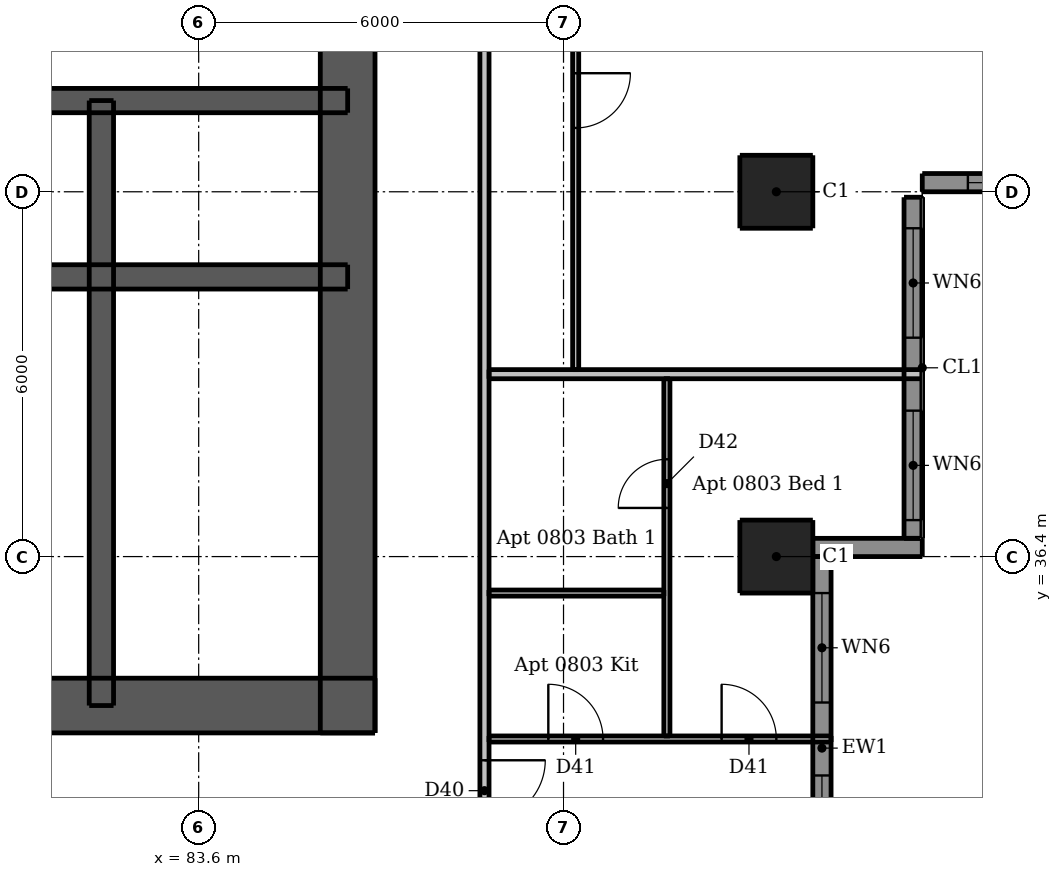
"""IFC4 building model, lengths in metres.
Left out: names, types, materials, properties, quantities, classifications, styles, units other than length and angle.
Written with IfcOpenShell. Run it as: python <this file> out.ifc"""

import sys

from ifc_helpers import new_model, si_unit, direction, frame, frame_2d, origin, origin_2d, place, context, subcontext, project, spatial, rectangle, extrude, element, fill, save


model = new_model("IFC4")
c1 = context("Model", 3, precision=1e-05, world=origin(), true_north=direction((0.0, 1.0)))
c2 = subcontext(c1, "Body", "Model", "MODEL_VIEW")
j1 = project(units=[si_unit("LENGTHUNIT", "METRE"), si_unit("PLANEANGLEUNIT", "RADIAN")], contexts=[c1])
p1 = place(None, origin())
s1 = spatial("IfcSite", under=j1, at=p1, CompositionType="ELEMENT")
p2 = place(p1, origin())
s2 = spatial("IfcBuilding", under=s1, at=p2, CompositionType="ELEMENT")
p3 = place(p2, frame((0.0, 0.0, 33.4)))
s3 = spatial("IfcBuildingStorey", under=s2, at=p3, CompositionType="ELEMENT", Elevation=33.4)
p4 = place(p3, frame((62.5, 33.95, 0.0), z_axis=(0.0, 0.0, 1.0), x_axis=(1.0, 0.0, 0.0)))
e1 = element("IfcWall", 1, at=p4, inside=s3, PredefinedType="SHEAR", context=c2, shape_type="SweptSolid", body=[
    extrude(rectangle(XDim=24.0, YDim=0.9, at=frame_2d((12.0, 0.0))), origin(), (0.0, 0.0, 1.0), 3.05),
])
p5 = place(p4, frame((2.05, 0.0, 0.0)))
e2 = element("IfcOpeningElement", 2, at=p5, cuts=e1, PredefinedType="OPENING", context=c2, shape_type="SweptSolid", body=[
    extrude(rectangle(XDim=1.1, YDim=2.1, at=frame_2d((0.55, 1.05))), frame((0.0, 0.46, 0.0), z_axis=(0.0, -1.0, 0.0), x_axis=(1.0, 0.0, 0.0)), (0.0, 0.0, 1.0), 0.92),
])
p6 = place(p4, frame((20.85, 0.0, 0.0)))
e3 = element("IfcOpeningElement", 3, at=p6, cuts=e1, PredefinedType="OPENING", context=c2, shape_type="SweptSolid", body=[
    extrude(rectangle(XDim=1.1, YDim=2.1, at=frame_2d((0.55, 1.05))), frame((0.0, 0.46, 0.0), z_axis=(0.0, -1.0, 0.0), x_axis=(1.0, 0.0, 0.0)), (0.0, 0.0, 1.0), 0.92),
])
p7 = place(p4, frame((8.0, 0.0, 0.0)))
e4 = element("IfcOpeningElement", 4, at=p7, cuts=e1, PredefinedType="OPENING", context=c2, shape_type="SweptSolid", body=[
    extrude(rectangle(XDim=1.1, YDim=2.1, at=frame_2d((0.55, 1.05))), frame((0.0, 0.46, 0.0), z_axis=(0.0, -1.0, 0.0), x_axis=(1.0, 0.0, 0.0)), (0.0, 0.0, 1.0), 0.92),
])
p8 = place(p4, frame((16.363, 0.0, 0.0)))
e5 = element("IfcOpeningElement", 5, at=p8, cuts=e1, PredefinedType="OPENING", context=c2, shape_type="SweptSolid", body=[
    extrude(rectangle(XDim=0.9, YDim=2.1, at=frame_2d((0.45, 1.05))), frame((0.0, 0.46, 0.0), z_axis=(0.0, -1.0, 0.0), x_axis=(1.0, 0.0, 0.0)), (0.0, 0.0, 1.0), 0.92),
])
p9 = place(p3, frame((86.05, 33.5, 0.0), z_axis=(0.0, 0.0, 1.0), x_axis=(0.0, 1.0, 0.0)))
e6 = element("IfcWall", 6, at=p9, inside=s3, PredefinedType="SHEAR", context=c2, shape_type="SweptSolid", body=[
    extrude(rectangle(XDim=24.0, YDim=0.9, at=frame_2d((12.0, 0.0))), origin(), (0.0, 0.0, 1.0), 3.05),
])
p10 = place(p9, frame((11.2, 0.0, 0.0)))
e7 = element("IfcOpeningElement", 7, at=p10, cuts=e6, PredefinedType="OPENING", context=c2, shape_type="SweptSolid", body=[
    extrude(rectangle(XDim=1.6, YDim=2.1, at=frame_2d((0.8, 1.05))), frame((0.0, 0.46, 0.0), z_axis=(0.0, -1.0, 0.0), x_axis=(1.0, 0.0, 0.0)), (0.0, 0.0, 1.0), 0.92),
])
p11 = place(p3, frame((62.95, 41.0, 0.0), z_axis=(0.0, 0.0, 1.0), x_axis=(1.0, 0.0, 0.0)))
e8 = element("IfcWall", 8, at=p11, inside=s3, PredefinedType="SHEAR", context=c2, shape_type="SweptSolid", body=[
    extrude(rectangle(XDim=23.1, YDim=0.4, at=frame_2d((11.55, 0.0))), origin(), (0.0, 0.0, 1.0), 3.05),
])
p12 = place(p3, frame((62.95, 43.9, 0.0), z_axis=(0.0, 0.0, 1.0), x_axis=(1.0, 0.0, 0.0)))
e9 = element("IfcWall", 9, at=p12, inside=s3, PredefinedType="SHEAR", context=c2, shape_type="SweptSolid", body=[
    extrude(rectangle(XDim=23.1, YDim=0.4, at=frame_2d((11.55, 0.0))), origin(), (0.0, 0.0, 1.0), 3.05),
])
p13 = place(p12, frame((0.85, 0.0, 0.0)))
e10 = element("IfcOpeningElement", 10, at=p13, cuts=e9, PredefinedType="OPENING", context=c2, shape_type="SweptSolid", body=[
    extrude(rectangle(XDim=0.9, YDim=2.1, at=frame_2d((0.45, 1.05))), frame((0.0, 0.21, 0.0), z_axis=(0.0, -1.0, 0.0), x_axis=(1.0, 0.0, 0.0)), (0.0, 0.0, 1.0), 0.42),
])
p14 = place(p12, frame((2.55, 0.0, 0.0)))
e11 = element("IfcOpeningElement", 11, at=p14, cuts=e9, PredefinedType="OPENING", context=c2, shape_type="SweptSolid", body=[
    extrude(rectangle(XDim=0.9, YDim=2.1, at=frame_2d((0.45, 1.05))), frame((0.0, 0.21, 0.0), z_axis=(0.0, -1.0, 0.0), x_axis=(1.0, 0.0, 0.0)), (0.0, 0.0, 1.0), 0.42),
])
p15 = place(p12, frame((20.5, 0.0, 0.0)))
e12 = element("IfcOpeningElement", 12, at=p15, cuts=e9, PredefinedType="OPENING", context=c2, shape_type="SweptSolid", body=[
    extrude(rectangle(XDim=0.9, YDim=2.1, at=frame_2d((0.45, 1.05))), frame((0.0, 0.21, 0.0), z_axis=(0.0, -1.0, 0.0), x_axis=(1.0, 0.0, 0.0)), (0.0, 0.0, 1.0), 0.42),
])
p16 = place(p12, frame((4.75, 0.0, 0.0)))
e13 = element("IfcOpeningElement", 13, at=p16, cuts=e9, PredefinedType="OPENING", context=c2, shape_type="SweptSolid", body=[
    extrude(rectangle(XDim=1.1, YDim=2.1, at=frame_2d((0.55, 1.05))), frame((0.0, 0.21, 0.0), z_axis=(0.0, -1.0, 0.0), x_axis=(1.0, 0.0, 0.0)), (0.0, 0.0, 1.0), 0.42),
])
p17 = place(p12, frame((7.25, 0.0, 0.0)))
e14 = element("IfcOpeningElement", 14, at=p17, cuts=e9, PredefinedType="OPENING", context=c2, shape_type="SweptSolid", body=[
    extrude(rectangle(XDim=1.1, YDim=2.1, at=frame_2d((0.55, 1.05))), frame((0.0, 0.21, 0.0), z_axis=(0.0, -1.0, 0.0), x_axis=(1.0, 0.0, 0.0)), (0.0, 0.0, 1.0), 0.42),
])
p18 = place(p12, frame((9.75, 0.0, 0.0)))
e15 = element("IfcOpeningElement", 15, at=p18, cuts=e9, PredefinedType="OPENING", context=c2, shape_type="SweptSolid", body=[
    extrude(rectangle(XDim=1.1, YDim=2.1, at=frame_2d((0.55, 1.05))), frame((0.0, 0.21, 0.0), z_axis=(0.0, -1.0, 0.0), x_axis=(1.0, 0.0, 0.0)), (0.0, 0.0, 1.0), 0.42),
])
p19 = place(p12, frame((12.25, 0.0, 0.0)))
e16 = element("IfcOpeningElement", 16, at=p19, cuts=e9, PredefinedType="OPENING", context=c2, shape_type="SweptSolid", body=[
    extrude(rectangle(XDim=1.1, YDim=2.1, at=frame_2d((0.55, 1.05))), frame((0.0, 0.21, 0.0), z_axis=(0.0, -1.0, 0.0), x_axis=(1.0, 0.0, 0.0)), (0.0, 0.0, 1.0), 0.42),
])
p20 = place(p12, frame((14.75, 0.0, 0.0)))
e17 = element("IfcOpeningElement", 17, at=p20, cuts=e9, PredefinedType="OPENING", context=c2, shape_type="SweptSolid", body=[
    extrude(rectangle(XDim=1.1, YDim=2.1, at=frame_2d((0.55, 1.05))), frame((0.0, 0.21, 0.0), z_axis=(0.0, -1.0, 0.0), x_axis=(1.0, 0.0, 0.0)), (0.0, 0.0, 1.0), 0.42),
])
p21 = place(p12, frame((17.25, 0.0, 0.0)))
e18 = element("IfcOpeningElement", 18, at=p21, cuts=e9, PredefinedType="OPENING", context=c2, shape_type="SweptSolid", body=[
    extrude(rectangle(XDim=1.1, YDim=2.1, at=frame_2d((0.55, 1.05))), frame((0.0, 0.21, 0.0), z_axis=(0.0, -1.0, 0.0), x_axis=(1.0, 0.0, 0.0)), (0.0, 0.0, 1.0), 0.42),
])
p22 = place(p3, frame((82.0, 33.95, 0.0), z_axis=(0.0, 0.0, 1.0), x_axis=(0.0, 1.0, 0.0)))
e19 = element("IfcWall", 19, at=p22, inside=s3, PredefinedType="SHEAR", context=c2, shape_type="SweptSolid", body=[
    extrude(rectangle(XDim=9.95, YDim=0.4, at=frame_2d((4.975, 0.0))), origin(), (0.0, 0.0, 1.0), 3.05),
])
for number, where, z_axis, x_axis in (
    (20, (93.1, 36.4, 0.0), (0.0, 0.0, 1.0), (1.0, 0.0, 0.0)),
    (21, (93.1, 42.4, 0.0), (0.0, 0.0, 1.0), (1.0, 0.0, 0.0)),
):
    element("IfcColumn", number, at=place(p3, frame(where, z_axis=z_axis, x_axis=x_axis)), inside=s3, PredefinedType="COLUMN", context=c2, shape_type="SweptSolid", body=[
        extrude(rectangle(XDim=1.2, YDim=1.2, at=origin_2d()), origin(), (0.0, 0.0, 1.0), 3.05),
    ])
p23 = place(p3, frame((93.7, 36.55, 0.0), z_axis=(0.0, 0.0, 1.0), x_axis=(1.0, 0.0, 0.0)))
e22 = element("IfcWall", 22, at=p23, inside=s3, PredefinedType="SOLIDWALL", context=c2, shape_type="SweptSolid", body=[
    extrude(rectangle(XDim=1.8, YDim=0.3, at=frame_2d((0.9, 0.0))), origin(), (0.0, 0.0, 1.0), 3.05),
])
p24 = place(p3, frame((95.5, 42.55, 0.0), z_axis=(0.0, 0.0, 1.0), x_axis=(1.0, 0.0, 0.0)))
e23 = element("IfcWall", 23, at=p24, inside=s3, PredefinedType="SOLIDWALL", context=c2, shape_type="SweptSolid", body=[
    extrude(rectangle(XDim=3.0, YDim=0.3, at=frame_2d((1.5, 0.0))), origin(), (0.0, 0.0, 1.0), 3.05),
])
p25 = place(p24, frame((0.75, 0.0, 0.9)))
e24 = element("IfcOpeningElement", 24, at=p25, cuts=e23, PredefinedType="OPENING", context=c2, shape_type="SweptSolid", body=[
    extrude(rectangle(XDim=1.5, YDim=1.5, at=frame_2d((0.75, 0.75))), frame((0.0, 0.16, 0.0), z_axis=(0.0, -1.0, 0.0), x_axis=(1.0, 0.0, 0.0)), (0.0, 0.0, 1.0), 0.32),
])
p26 = place(p3, frame((93.85, 30.1, 0.0), z_axis=(0.0, 0.0, 1.0), x_axis=(0.0, 1.0, 0.0)))
e25 = element("IfcWall", 25, at=p26, inside=s3, PredefinedType="SOLIDWALL", context=c2, shape_type="SweptSolid", body=[
    extrude(rectangle(XDim=6.3, YDim=0.3, at=frame_2d((3.15, 0.0))), origin(), (0.0, 0.0, 1.0), 3.05),
])
p27 = place(p26, frame((0.9, 0.0, 0.15)))
e26 = element("IfcOpeningElement", 26, at=p27, cuts=e25, PredefinedType="OPENING", context=c2, shape_type="SweptSolid", body=[
    extrude(rectangle(XDim=1.8, YDim=2.1, at=frame_2d((0.9, 1.05))), frame((0.0, 0.16, 0.0), z_axis=(0.0, -1.0, 0.0), x_axis=(1.0, 0.0, 0.0)), (0.0, 0.0, 1.0), 0.32),
])
p28 = place(p26, frame((3.9, 0.0, 0.15)))
e27 = element("IfcOpeningElement", 27, at=p28, cuts=e25, PredefinedType="OPENING", context=c2, shape_type="SweptSolid", body=[
    extrude(rectangle(XDim=1.8, YDim=2.1, at=frame_2d((0.9, 1.05))), frame((0.0, 0.16, 0.0), z_axis=(0.0, -1.0, 0.0), x_axis=(1.0, 0.0, 0.0)), (0.0, 0.0, 1.0), 0.32),
])
p29 = place(p3, frame((95.35, 36.7, 0.0), z_axis=(0.0, 0.0, 1.0), x_axis=(0.0, 1.0, 0.0)))
e28 = element("IfcWall", 28, at=p29, inside=s3, PredefinedType="SOLIDWALL", context=c2, shape_type="SweptSolid", body=[
    extrude(rectangle(XDim=5.61, YDim=0.3, at=frame_2d((2.805, 0.0))), origin(), (0.0, 0.0, 1.0), 3.05),
])
p30 = place(p29, frame((0.3, 0.0, 0.15)))
e29 = element("IfcOpeningElement", 29, at=p30, cuts=e28, PredefinedType="OPENING", context=c2, shape_type="SweptSolid", body=[
    extrude(rectangle(XDim=1.8, YDim=2.1, at=frame_2d((0.9, 1.05))), frame((0.0, 0.16, 0.0), z_axis=(0.0, -1.0, 0.0), x_axis=(1.0, 0.0, 0.0)), (0.0, 0.0, 1.0), 0.32),
])
p31 = place(p29, frame((3.3, 0.0, 0.15)))
e30 = element("IfcOpeningElement", 30, at=p31, cuts=e28, PredefinedType="OPENING", context=c2, shape_type="SweptSolid", body=[
    extrude(rectangle(XDim=1.8, YDim=2.1, at=frame_2d((0.9, 1.05))), frame((0.0, 0.16, 0.0), z_axis=(0.0, -1.0, 0.0), x_axis=(1.0, 0.0, 0.0)), (0.0, 0.0, 1.0), 0.32),
])
p32 = place(p3, frame((89.8, 59.35, 0.0), z_axis=(0.0, 0.0, 1.0), x_axis=(0.0, -1.0, 0.0)))
e31 = element("IfcWall", 31, at=p32, inside=s3, PredefinedType="PARTITIONING", context=c2, shape_type="SweptSolid", body=[
    extrude(rectangle(XDim=19.875, YDim=0.1, at=frame_2d((9.938, 0.0))), origin(), (0.0, 0.0, 1.0), 3.05),
])
p33 = place(p32, frame((15.0, 0.0, 0.0)))
e32 = element("IfcOpeningElement", 32, at=p33, cuts=e31, PredefinedType="OPENING", context=c2, shape_type="SweptSolid", body=[
    extrude(rectangle(XDim=0.9, YDim=2.1, at=frame_2d((0.45, 1.05))), frame((0.0, 0.06, 0.0), z_axis=(0.0, -1.0, 0.0), x_axis=(1.0, 0.0, 0.0)), (0.0, 0.0, 1.0), 0.12),
])
p34 = place(p32, frame((9.0, 0.0, 0.0)))
e33 = element("IfcOpeningElement", 33, at=p34, cuts=e31, PredefinedType="OPENING", context=c2, shape_type="SweptSolid", body=[
    extrude(rectangle(XDim=0.9, YDim=2.1, at=frame_2d((0.45, 1.05))), frame((0.0, 0.06, 0.0), z_axis=(0.0, -1.0, 0.0), x_axis=(1.0, 0.0, 0.0)), (0.0, 0.0, 1.0), 0.12),
])
p35 = place(p32, frame((6.0, 0.0, 0.0)))
e34 = element("IfcOpeningElement", 34, at=p35, cuts=e31, PredefinedType="OPENING", context=c2, shape_type="SweptSolid", body=[
    extrude(rectangle(XDim=0.9, YDim=2.1, at=frame_2d((0.45, 1.05))), frame((0.0, 0.06, 0.0), z_axis=(0.0, -1.0, 0.0), x_axis=(1.0, 0.0, 0.0)), (0.0, 0.0, 1.0), 0.12),
])
p36 = place(p32, frame((0.85, 0.0, 0.0)))
e35 = element("IfcOpeningElement", 35, at=p36, cuts=e31, PredefinedType="OPENING", context=c2, shape_type="SweptSolid", body=[
    extrude(rectangle(XDim=0.9, YDim=2.1, at=frame_2d((0.45, 1.05))), frame((0.0, 0.06, 0.0), z_axis=(0.0, -1.0, 0.0), x_axis=(1.0, 0.0, 0.0)), (0.0, 0.0, 1.0), 0.12),
])
p37 = place(p32, frame((3.35, 0.0, 0.0)))
e36 = element("IfcOpeningElement", 36, at=p37, cuts=e31, PredefinedType="OPENING", context=c2, shape_type="SweptSolid", body=[
    extrude(rectangle(XDim=0.8, YDim=2.1, at=frame_2d((0.4, 1.05))), frame((0.0, 0.06, 0.0), z_axis=(0.0, -1.0, 0.0), x_axis=(1.0, 0.0, 0.0)), (0.0, 0.0, 1.0), 0.12),
])
p38 = place(p3, frame((91.3, 33.45, 0.0), z_axis=(0.0, 0.0, 1.0), x_axis=(0.0, 1.0, 0.0)))
e37 = element("IfcWall", 37, at=p38, inside=s3, PredefinedType="PARTITIONING", context=c2, shape_type="SweptSolid", body=[
    extrude(rectangle(XDim=5.875, YDim=0.1, at=frame_2d((2.938, 0.0))), origin(), (0.0, 0.0, 1.0), 3.05),
])
p39 = place(p38, frame((3.75, 0.0, 0.0)))
e38 = element("IfcOpeningElement", 38, at=p39, cuts=e37, PredefinedType="OPENING", context=c2, shape_type="SweptSolid", body=[
    extrude(rectangle(XDim=0.8, YDim=2.1, at=frame_2d((0.4, 1.05))), frame((0.0, 0.06, 0.0), z_axis=(0.0, -1.0, 0.0), x_axis=(1.0, 0.0, 0.0)), (0.0, 0.0, 1.0), 0.12),
])
p40 = place(p3, frame((88.375, 35.8, 0.0), z_axis=(0.0, 0.0, 1.0), x_axis=(1.0, 0.0, 0.0)))
e39 = element("IfcWall", 39, at=p40, inside=s3, PredefinedType="PARTITIONING", context=c2, shape_type="SweptSolid", body=[
    extrude(rectangle(XDim=2.875, YDim=0.1, at=frame_2d((1.438, 0.0))), origin(), (0.0, 0.0, 1.0), 3.05),
])
p41 = place(p3, frame((88.375, 33.4, 0.0), z_axis=(0.0, 0.0, 1.0), x_axis=(1.0, 0.0, 0.0)))
e40 = element("IfcWall", 40, at=p41, inside=s3, PredefinedType="PARTITIONING", context=c2, shape_type="SweptSolid", body=[
    extrude(rectangle(XDim=5.625, YDim=0.1, at=frame_2d((2.812, 0.0))), origin(), (0.0, 0.0, 1.0), 3.05),
])
p42 = place(p41, frame((0.975, 0.0, 0.0)))
e41 = element("IfcOpeningElement", 41, at=p42, cuts=e40, PredefinedType="OPENING", context=c2, shape_type="SweptSolid", body=[
    extrude(rectangle(XDim=0.9, YDim=2.1, at=frame_2d((0.45, 1.05))), frame((0.0, 0.06, 0.0), z_axis=(0.0, -1.0, 0.0), x_axis=(1.0, 0.0, 0.0)), (0.0, 0.0, 1.0), 0.12),
])
p43 = place(p41, frame((3.825, 0.0, 0.0)))
e42 = element("IfcOpeningElement", 42, at=p43, cuts=e40, PredefinedType="OPENING", context=c2, shape_type="SweptSolid", body=[
    extrude(rectangle(XDim=0.9, YDim=2.1, at=frame_2d((0.45, 1.05))), frame((0.0, 0.06, 0.0), z_axis=(0.0, -1.0, 0.0), x_axis=(1.0, 0.0, 0.0)), (0.0, 0.0, 1.0), 0.12),
])
p44 = place(p3, frame((88.3, 60.475, 0.0), z_axis=(0.0, 0.0, 1.0), x_axis=(0.0, -1.0, 0.0)))
e43 = element("IfcWall", 43, at=p44, inside=s3, PredefinedType="PARTITIONING", context=c2, shape_type="SweptSolid", body=[
    extrude(rectangle(XDim=28.7, YDim=0.15, at=frame_2d((14.35, 0.0))), origin(), (0.0, 0.0, 1.0), 3.05),
])
p45 = place(p44, frame((27.425, 0.0, 0.0)))
e44 = element("IfcOpeningElement", 44, at=p45, cuts=e43, PredefinedType="OPENING", context=c2, shape_type="SweptSolid", body=[
    extrude(rectangle(XDim=1.0, YDim=2.1, at=frame_2d((0.5, 1.05))), frame((0.0, 0.085, 0.0), z_axis=(0.0, -1.0, 0.0), x_axis=(1.0, 0.0, 0.0)), (0.0, 0.0, 1.0), 0.17),
])
p46 = place(p44, frame((10.625, 0.0, 0.0)))
e45 = element("IfcOpeningElement", 45, at=p46, cuts=e43, PredefinedType="OPENING", context=c2, shape_type="SweptSolid", body=[
    extrude(rectangle(XDim=1.0, YDim=2.1, at=frame_2d((0.5, 1.05))), frame((0.0, 0.085, 0.0), z_axis=(0.0, -1.0, 0.0), x_axis=(1.0, 0.0, 0.0)), (0.0, 0.0, 1.0), 0.17),
])
p47 = place(p3, frame((88.375, 39.4, 0.0), z_axis=(0.0, 0.0, 1.0), x_axis=(1.0, 0.0, 0.0)))
e46 = element("IfcWall", 46, at=p47, inside=s3, PredefinedType="PARTITIONING", context=c2, shape_type="SweptSolid", body=[
    extrude(rectangle(XDim=7.125, YDim=0.15, at=frame_2d((3.562, 0.0))), origin(), (0.0, 0.0, 1.0), 3.05),
])
p48 = place(p25, origin())
e47 = element("IfcWindow", 47, at=p48, inside=s3, PartitioningType="DOUBLE_PANEL_VERTICAL", PredefinedType="WINDOW", context=c2, shape_type="SweptSolid", body=[
    extrude(rectangle(XDim=1.5, YDim=1.5, at=frame_2d((0.75, 0.75))), frame((0.0, 0.03, 0.0), z_axis=(0.0, -1.0, 0.0), x_axis=(1.0, 0.0, 0.0)), (0.0, 0.0, 1.0), 0.06),
])
fill(e24, e47)
p49 = place(p27, origin())
e48 = element("IfcWindow", 48, at=p49, inside=s3, PartitioningType="DOUBLE_PANEL_VERTICAL", PredefinedType="WINDOW", context=c2, shape_type="SweptSolid", body=[
    extrude(rectangle(XDim=1.8, YDim=2.1, at=frame_2d((0.9, 1.05))), frame((0.0, 0.03, 0.0), z_axis=(0.0, -1.0, 0.0), x_axis=(1.0, 0.0, 0.0)), (0.0, 0.0, 1.0), 0.06),
])
fill(e26, e48)
p50 = place(p28, origin())
e49 = element("IfcWindow", 49, at=p50, inside=s3, PartitioningType="DOUBLE_PANEL_VERTICAL", PredefinedType="WINDOW", context=c2, shape_type="SweptSolid", body=[
    extrude(rectangle(XDim=1.8, YDim=2.1, at=frame_2d((0.9, 1.05))), frame((0.0, 0.03, 0.0), z_axis=(0.0, -1.0, 0.0), x_axis=(1.0, 0.0, 0.0)), (0.0, 0.0, 1.0), 0.06),
])
fill(e27, e49)
p51 = place(p30, origin())
e50 = element("IfcWindow", 50, at=p51, inside=s3, PartitioningType="DOUBLE_PANEL_VERTICAL", PredefinedType="WINDOW", context=c2, shape_type="SweptSolid", body=[
    extrude(rectangle(XDim=1.8, YDim=2.1, at=frame_2d((0.9, 1.05))), frame((0.0, 0.03, 0.0), z_axis=(0.0, -1.0, 0.0), x_axis=(1.0, 0.0, 0.0)), (0.0, 0.0, 1.0), 0.06),
])
fill(e29, e50)
p52 = place(p31, origin())
e51 = element("IfcWindow", 51, at=p52, inside=s3, PartitioningType="DOUBLE_PANEL_VERTICAL", PredefinedType="WINDOW", context=c2, shape_type="SweptSolid", body=[
    extrude(rectangle(XDim=1.8, YDim=2.1, at=frame_2d((0.9, 1.05))), frame((0.0, 0.03, 0.0), z_axis=(0.0, -1.0, 0.0), x_axis=(1.0, 0.0, 0.0)), (0.0, 0.0, 1.0), 0.06),
])
fill(e30, e51)
p53 = place(p6, origin())
e52 = element("IfcDoor", 52, at=p53, inside=s3, OperationType="SINGLE_SWING_RIGHT", PredefinedType="DOOR", context=c2, shape_type="SweptSolid", body=[
    extrude(rectangle(XDim=1.1, YDim=2.1, at=frame_2d((0.55, 1.05))), frame((0.0, 0.438, 0.0), z_axis=(0.0, -1.0, 0.0), x_axis=(1.0, 0.0, 0.0)), (0.0, 0.0, 1.0), 0.05),
])
fill(e3, e52)
p54 = place(p15, origin())
e53 = element("IfcDoor", 53, at=p54, inside=s3, OperationType="SINGLE_SWING_LEFT", PredefinedType="DOOR", context=c2, shape_type="SweptSolid", body=[
    extrude(rectangle(XDim=0.9, YDim=2.1, at=frame_2d((0.45, 1.05))), frame((0.0, -0.138, 0.0), z_axis=(0.0, -1.0, 0.0), x_axis=(1.0, 0.0, 0.0)), (0.0, 0.0, 1.0), 0.05),
])
fill(e12, e53)
p55 = place(p21, origin())
e54 = element("IfcDoor", 54, at=p55, inside=s3, OperationType="DOUBLE_DOOR_SLIDING", PredefinedType="DOOR", context=c2, shape_type="SweptSolid", body=[
    extrude(rectangle(XDim=1.1, YDim=2.1, at=frame_2d((0.55, 1.05))), frame((0.0, 0.025, 0.0), z_axis=(0.0, -1.0, 0.0), x_axis=(1.0, 0.0, 0.0)), (0.0, 0.0, 1.0), 0.05),
])
fill(e18, e54)
p56 = place(p45, origin())
e55 = element("IfcDoor", 55, at=p56, inside=s3, OperationType="SINGLE_SWING_LEFT", PredefinedType="DOOR", context=c2, shape_type="SweptSolid", body=[
    extrude(rectangle(XDim=1.0, YDim=2.1, at=frame_2d((0.5, 1.05))), frame((0.0, 0.025, 0.0), z_axis=(0.0, -1.0, 0.0), x_axis=(1.0, 0.0, 0.0)), (0.0, 0.0, 1.0), 0.05),
])
fill(e44, e55)
p57 = place(p42, origin())
e56 = element("IfcDoor", 56, at=p57, inside=s3, OperationType="SINGLE_SWING_LEFT", PredefinedType="DOOR", context=c2, shape_type="SweptSolid", body=[
    extrude(rectangle(XDim=0.9, YDim=2.1, at=frame_2d((0.45, 1.05))), frame((0.0, 0.025, 0.0), z_axis=(0.0, -1.0, 0.0), x_axis=(1.0, 0.0, 0.0)), (0.0, 0.0, 1.0), 0.05),
])
fill(e41, e56)
p58 = place(p43, origin())
e57 = element("IfcDoor", 57, at=p58, inside=s3, OperationType="SINGLE_SWING_LEFT", PredefinedType="DOOR", context=c2, shape_type="SweptSolid", body=[
    extrude(rectangle(XDim=0.9, YDim=2.1, at=frame_2d((0.45, 1.05))), frame((0.0, 0.025, 0.0), z_axis=(0.0, -1.0, 0.0), x_axis=(1.0, 0.0, 0.0)), (0.0, 0.0, 1.0), 0.05),
])
fill(e42, e57)
p59 = place(p39, origin())
e58 = element("IfcDoor", 58, at=p59, inside=s3, OperationType="SINGLE_SWING_LEFT", PredefinedType="DOOR", context=c2, shape_type="SweptSolid", body=[
    extrude(rectangle(XDim=0.8, YDim=2.1, at=frame_2d((0.4, 1.05))), frame((0.0, 0.025, 0.0), z_axis=(0.0, -1.0, 0.0), x_axis=(1.0, 0.0, 0.0)), (0.0, 0.0, 1.0), 0.05),
])
fill(e38, e58)
p60 = place(p33, origin())
e59 = element("IfcDoor", 59, at=p60, inside=s3, OperationType="SINGLE_SWING_LEFT", PredefinedType="DOOR", context=c2, shape_type="SweptSolid", body=[
    extrude(rectangle(XDim=0.9, YDim=2.1, at=frame_2d((0.45, 1.05))), frame((0.0, 0.025, 0.0), z_axis=(0.0, -1.0, 0.0), x_axis=(1.0, 0.0, 0.0)), (0.0, 0.0, 1.0), 0.05),
])
fill(e32, e59)
save(model, sys.argv[1])
